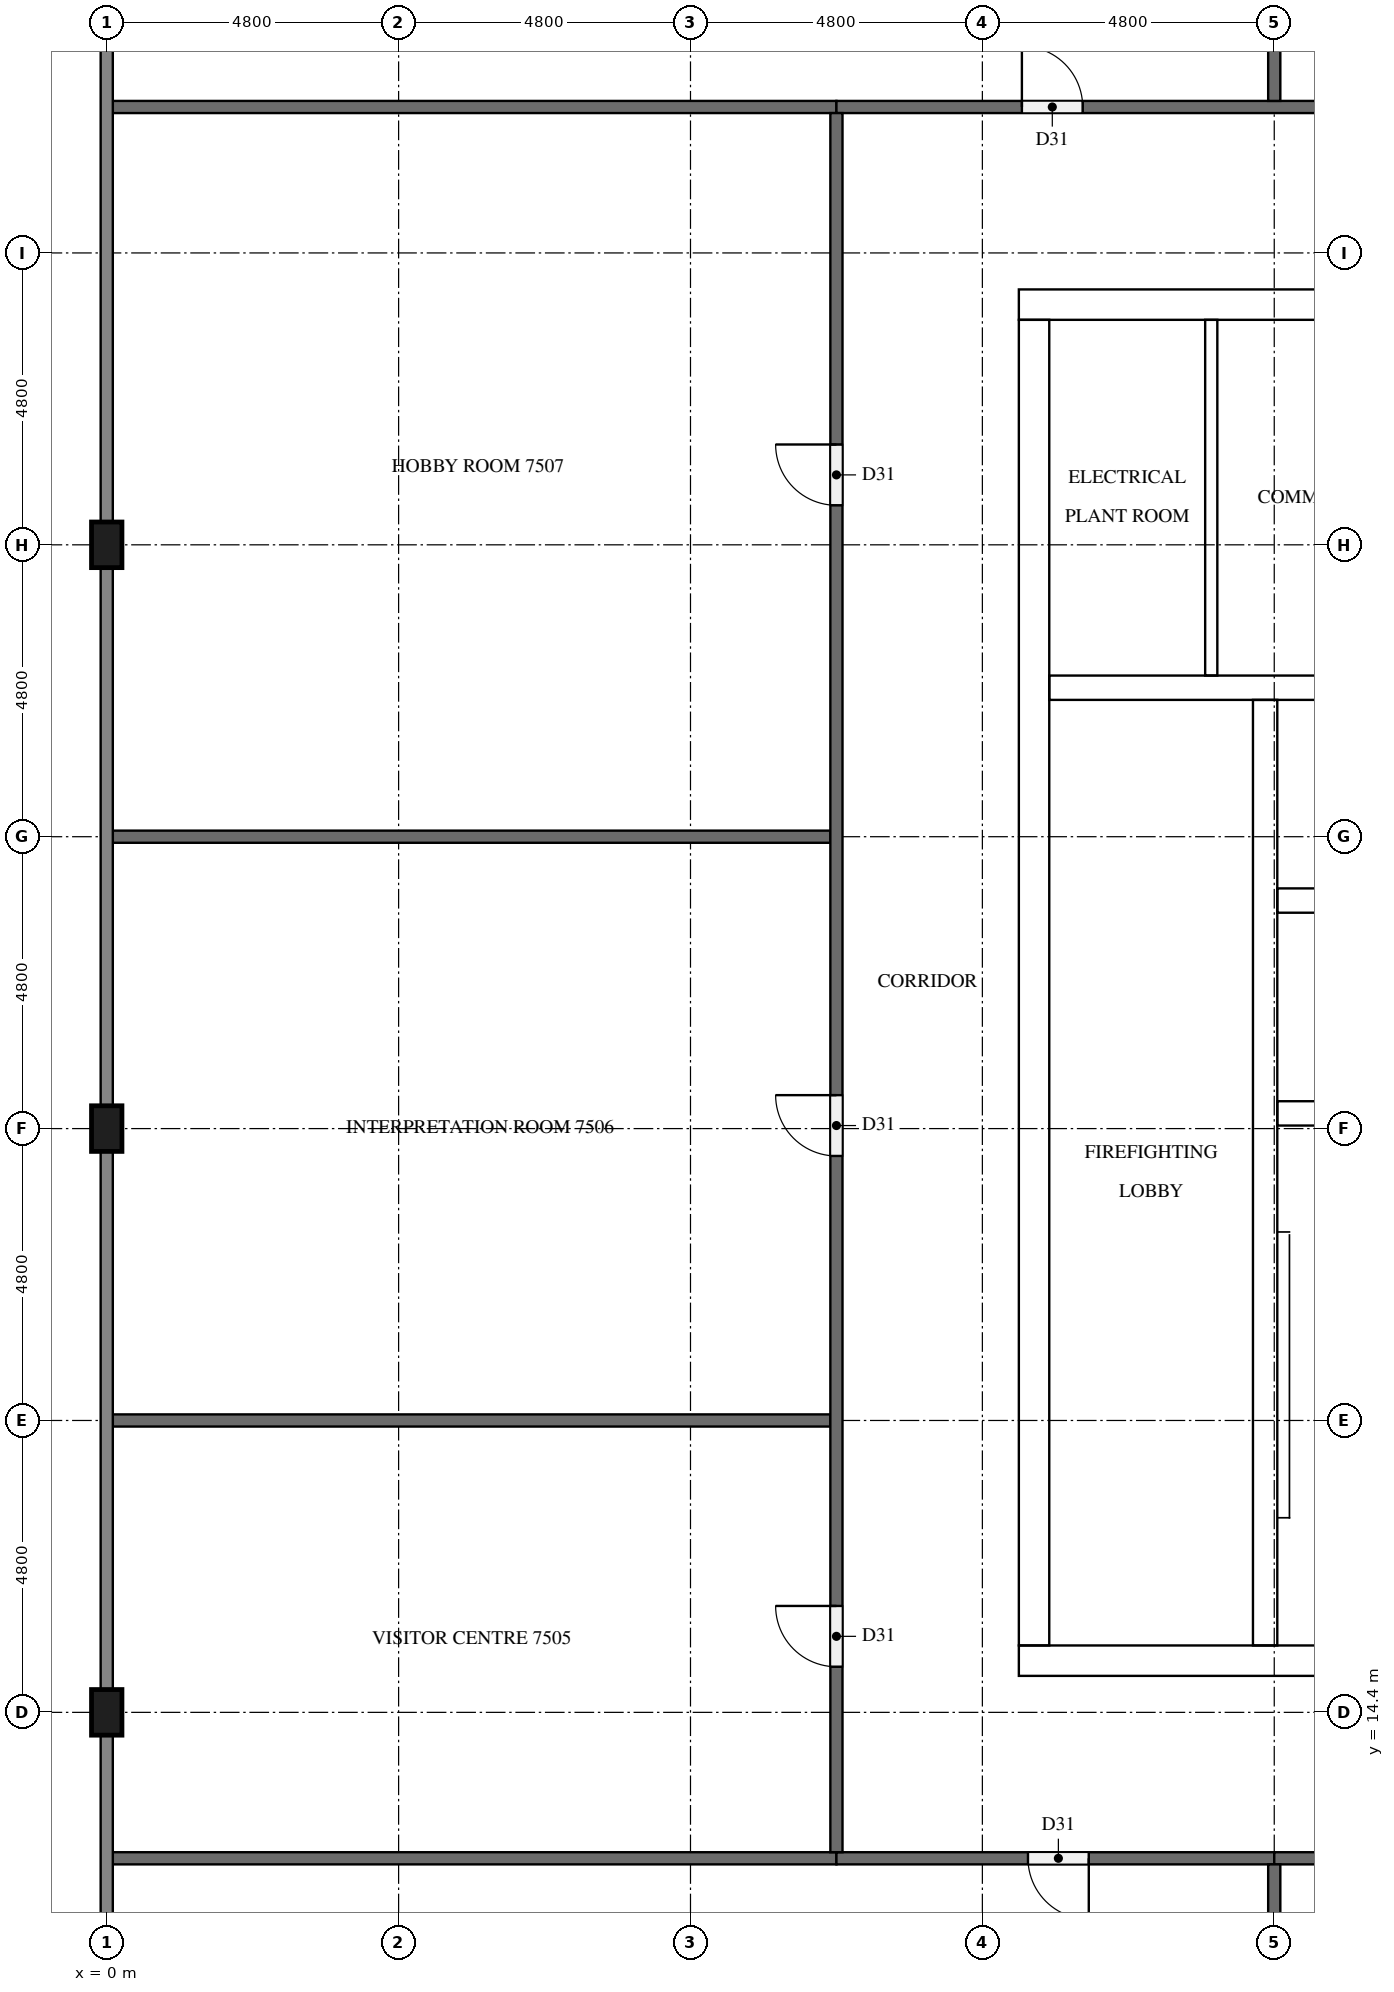
"""IFC4 building model, lengths in metres.
Left out: names, types, materials, properties, quantities, classifications, styles, units other than length and angle.
Written with IfcOpenShell. Run it as: python <this file> out.ifc"""

import sys

from ifc_helpers import new_model, si_unit, direction, frame, frame_2d, origin, origin_2d, place, context, subcontext, project, spatial, rectangle, extrude, element, fill, save


model = new_model("IFC4")
c1 = context("Model", 3, precision=1e-05, world=origin(), true_north=direction((0.0, 1.0)))
c2 = subcontext(c1, "Body", "Model", "MODEL_VIEW")
j1 = project(units=[si_unit("LENGTHUNIT", "METRE"), si_unit("PLANEANGLEUNIT", "RADIAN")], contexts=[c1])
p1 = place(None, origin())
s1 = spatial("IfcSite", under=j1, at=p1, CompositionType="ELEMENT")
p2 = place(p1, origin())
s2 = spatial("IfcBuilding", under=s1, at=p2, CompositionType="ELEMENT")
p3 = place(p2, frame((0.0, 0.0, 286.1)))
s3 = spatial("IfcBuildingStorey", under=s2, at=p3, CompositionType="ELEMENT", Elevation=286.1)
p4 = place(p3, frame((15.0, 15.25, 0.0), z_axis=(0.0, 0.0, 1.0), x_axis=(1.0, 0.0, 0.0)))
e1 = element("IfcWall", 1, at=p4, inside=s3, PredefinedType="SHEAR", context=c2, shape_type="SweptSolid", body=[
    extrude(rectangle(XDim=32.4, YDim=0.5, at=frame_2d((16.2, 0.0))), origin(), (0.0, 0.0, 1.0), 5.1),
])
p5 = place(p4, frame((15.3, 0.0, 0.0)))
e2 = element("IfcOpeningElement", 2, at=p5, cuts=e1, PredefinedType="OPENING", context=c2, shape_type="SweptSolid", body=[
    extrude(rectangle(XDim=1.8, YDim=2.1, at=frame_2d((0.9, 1.05))), frame((0.0, 0.26, 0.0), z_axis=(0.0, -1.0, 0.0), x_axis=(1.0, 0.0, 0.0)), (0.0, 0.0, 1.0), 0.52),
])
p6 = place(p3, frame((15.0, 37.55, 0.0), z_axis=(0.0, 0.0, 1.0), x_axis=(1.0, 0.0, 0.0)))
e3 = element("IfcWall", 3, at=p6, inside=s3, PredefinedType="SHEAR", context=c2, shape_type="SweptSolid", body=[
    extrude(rectangle(XDim=32.4, YDim=0.5, at=frame_2d((16.2, 0.0))), origin(), (0.0, 0.0, 1.0), 5.1),
])
p7 = place(p6, frame((15.3, 0.0, 0.0)))
e4 = element("IfcOpeningElement", 4, at=p7, cuts=e3, PredefinedType="OPENING", context=c2, shape_type="SweptSolid", body=[
    extrude(rectangle(XDim=1.8, YDim=2.1, at=frame_2d((0.9, 1.05))), frame((0.0, 0.26, 0.0), z_axis=(0.0, -1.0, 0.0), x_axis=(1.0, 0.0, 0.0)), (0.0, 0.0, 1.0), 0.52),
])
p8 = place(p6, frame((1.282, 0.0, 0.0)))
e5 = element("IfcOpeningElement", 5, at=p8, cuts=e3, PredefinedType="OPENING", context=c2, shape_type="SweptSolid", body=[
    extrude(rectangle(XDim=1.0, YDim=2.1, at=frame_2d((0.5, 1.05))), frame((0.0, 0.26, 0.0), z_axis=(0.0, -1.0, 0.0), x_axis=(1.0, 0.0, 0.0)), (0.0, 0.0, 1.0), 0.52),
])
p9 = place(p6, frame((5.082, 0.0, 0.0)))
e6 = element("IfcOpeningElement", 6, at=p9, cuts=e3, PredefinedType="OPENING", context=c2, shape_type="SweptSolid", body=[
    extrude(rectangle(XDim=1.0, YDim=2.1, at=frame_2d((0.5, 1.05))), frame((0.0, 0.26, 0.0), z_axis=(0.0, -1.0, 0.0), x_axis=(1.0, 0.0, 0.0)), (0.0, 0.0, 1.0), 0.52),
])
p10 = place(p3, frame((15.25, 15.5, 0.0), z_axis=(0.0, 0.0, 1.0), x_axis=(0.0, 1.0, 0.0)))
e7 = element("IfcWall", 7, at=p10, inside=s3, PredefinedType="SHEAR", context=c2, shape_type="SweptSolid", body=[
    extrude(rectangle(XDim=21.8, YDim=0.5, at=frame_2d((10.9, 0.0))), origin(), (0.0, 0.0, 1.0), 5.1),
])
p11 = place(p10, frame((5.26, 0.0, 0.0)))
e8 = element("IfcOpeningElement", 8, at=p11, cuts=e7, PredefinedType="OPENING", context=c2, shape_type="SweptSolid", body=[
    extrude(rectangle(XDim=1.2, YDim=2.1, at=frame_2d((0.6, 1.05))), frame((0.0, 0.26, 0.0), z_axis=(0.0, -1.0, 0.0), x_axis=(1.0, 0.0, 0.0)), (0.0, 0.0, 1.0), 0.52),
])
p12 = place(p3, frame((19.05, 15.5, 0.0), z_axis=(0.0, 0.0, 1.0), x_axis=(0.0, 1.0, 0.0)))
e9 = element("IfcWall", 9, at=p12, inside=s3, PredefinedType="SHEAR", context=c2, shape_type="SweptSolid", body=[
    extrude(rectangle(XDim=15.55, YDim=0.4, at=frame_2d((7.775, 0.0))), origin(), (0.0, 0.0, 1.0), 5.1),
])
p13 = place(p12, frame((9.95, 0.0, 0.0)))
e10 = element("IfcOpeningElement", 10, at=p13, cuts=e9, PredefinedType="OPENING", context=c2, shape_type="SweptSolid", body=[
    extrude(rectangle(XDim=1.1, YDim=2.1, at=frame_2d((0.55, 1.05))), frame((0.0, 0.21, 0.0), z_axis=(0.0, -1.0, 0.0), x_axis=(1.0, 0.0, 0.0)), (0.0, 0.0, 1.0), 0.42),
])
p14 = place(p12, frame((13.45, 0.0, 0.0)))
e11 = element("IfcOpeningElement", 11, at=p14, cuts=e9, PredefinedType="OPENING", context=c2, shape_type="SweptSolid", body=[
    extrude(rectangle(XDim=1.1, YDim=2.1, at=frame_2d((0.55, 1.05))), frame((0.0, 0.21, 0.0), z_axis=(0.0, -1.0, 0.0), x_axis=(1.0, 0.0, 0.0)), (0.0, 0.0, 1.0), 0.42),
])
p15 = place(p12, frame((0.7, 0.0, 0.0)))
e12 = element("IfcOpeningElement", 12, at=p15, cuts=e9, PredefinedType="OPENING", context=c2, shape_type="SweptSolid", body=[
    extrude(rectangle(XDim=1.2, YDim=2.1, at=frame_2d((0.6, 1.05))), frame((0.0, 0.21, 0.0), z_axis=(0.0, -1.0, 0.0), x_axis=(1.0, 0.0, 0.0)), (0.0, 0.0, 1.0), 0.42),
])
for number, where, z_axis, x_axis in (
    (13, (19.25, 24.25, 0.0), (0.0, 0.0, 1.0), (1.0, 0.0, 0.0)),
    (14, (19.25, 27.75, 0.0), (0.0, 0.0, 1.0), (1.0, 0.0, 0.0)),
):
    element("IfcWall", number, at=place(p3, frame(where, z_axis=z_axis, x_axis=x_axis)), inside=s3, PredefinedType="SHEAR", context=c2, shape_type="SweptSolid", body=[
        extrude(rectangle(XDim=3.65, YDim=0.4, at=frame_2d((1.825, 0.0))), origin(), (0.0, 0.0, 1.0), 5.1),
    ])
p16 = place(p3, frame((15.5, 31.25, 0.0), z_axis=(0.0, 0.0, 1.0), x_axis=(1.0, 0.0, 0.0)))
e15 = element("IfcWall", 15, at=p16, inside=s3, PredefinedType="SHEAR", context=c2, shape_type="SweptSolid", body=[
    extrude(rectangle(XDim=7.4, YDim=0.4, at=frame_2d((3.7, 0.0))), origin(), (0.0, 0.0, 1.0), 5.1),
])
for number, where, z_axis, x_axis in (
    (16, (0.0, 33.6, 0.0), (0.0, 0.0, 1.0), (0.0, 1.0, 0.0)),
    (17, (0.0, 24.0, 0.0), (0.0, 0.0, 1.0), (0.0, 1.0, 0.0)),
    (18, (0.0, 14.4, 0.0), (0.0, 0.0, 1.0), (0.0, 1.0, 0.0)),
):
    element("IfcColumn", number, at=place(p3, frame(where, z_axis=z_axis, x_axis=x_axis)), inside=s3, PredefinedType="COLUMN", context=c2, shape_type="SweptSolid", body=[
        extrude(rectangle(XDim=0.75, YDim=0.5, at=origin_2d()), origin(), (0.0, 0.0, 1.0), 5.1),
    ])
p17 = place(p3, frame((18.164, 31.45, 0.0), z_axis=(0.0, 0.0, 1.0), x_axis=(0.0, 1.0, 0.0)))
e19 = element("IfcWall", 19, at=p17, inside=s3, PredefinedType="PARTITIONING", context=c2, shape_type="SweptSolid", body=[
    extrude(rectangle(XDim=5.85, YDim=0.2, at=frame_2d((2.925, 0.0))), origin(), (0.0, 0.0, 1.0), 5.1),
])
p18 = place(p3, frame((0.1, 12.0, 0.0), z_axis=(0.0, 0.0, 1.0), x_axis=(1.0, 0.0, 0.0)))
e20 = element("IfcWall", 20, at=p18, inside=s3, PredefinedType="PARTITIONING", context=c2, shape_type="SweptSolid", body=[
    extrude(rectangle(XDim=11.9, YDim=0.2, at=frame_2d((5.95, 0.0))), origin(), (0.0, 0.0, 1.0), 5.1),
])
p19 = place(p3, frame((19.2, 12.0, 0.0), z_axis=(0.0, 0.0, 1.0), x_axis=(-1.0, 0.0, 0.0)))
e21 = element("IfcWall", 21, at=p19, inside=s3, PredefinedType="PARTITIONING", context=c2, shape_type="SweptSolid", body=[
    extrude(rectangle(XDim=7.2, YDim=0.2, at=frame_2d((3.6, 0.0))), origin(), (0.0, 0.0, 1.0), 5.1),
])
p20 = place(p19, frame((3.05, 0.0, 0.0)))
e22 = element("IfcOpeningElement", 22, at=p20, cuts=e21, PredefinedType="OPENING", context=c2, shape_type="SweptSolid", body=[
    extrude(rectangle(XDim=1.0, YDim=2.1, at=frame_2d((0.5, 1.05))), frame((0.0, 0.11, 0.0), z_axis=(0.0, -1.0, 0.0), x_axis=(1.0, 0.0, 0.0)), (0.0, 0.0, 1.0), 0.22),
])
p21 = place(p3, frame((19.2, 12.0, 0.0), z_axis=(0.0, 0.0, 1.0), x_axis=(1.0, 0.0, 0.0)))
e23 = element("IfcWall", 23, at=p21, inside=s3, PredefinedType="PARTITIONING", context=c2, shape_type="SweptSolid", body=[
    extrude(rectangle(XDim=9.6, YDim=0.2, at=frame_2d((4.8, 0.0))), origin(), (0.0, 0.0, 1.0), 5.1),
])
p22 = place(p21, frame((6.65, 0.0, 0.0)))
e24 = element("IfcOpeningElement", 24, at=p22, cuts=e23, PredefinedType="OPENING", context=c2, shape_type="SweptSolid", body=[
    extrude(rectangle(XDim=1.0, YDim=2.1, at=frame_2d((0.5, 1.05))), frame((0.0, 0.11, 0.0), z_axis=(0.0, -1.0, 0.0), x_axis=(1.0, 0.0, 0.0)), (0.0, 0.0, 1.0), 0.22),
])
p23 = place(p21, frame((1.85, 0.0, 0.0)))
e25 = element("IfcOpeningElement", 25, at=p23, cuts=e23, PredefinedType="OPENING", context=c2, shape_type="SweptSolid", body=[
    extrude(rectangle(XDim=1.0, YDim=2.1, at=frame_2d((0.5, 1.05))), frame((0.0, 0.11, 0.0), z_axis=(0.0, -1.0, 0.0), x_axis=(1.0, 0.0, 0.0)), (0.0, 0.0, 1.0), 0.22),
])
for number, where, z_axis, x_axis in (
    (26, (0.1, 19.2, 0.0), (0.0, 0.0, 1.0), (1.0, 0.0, 0.0)),
    (27, (0.1, 28.8, 0.0), (0.0, 0.0, 1.0), (1.0, 0.0, 0.0)),
):
    element("IfcWall", number, at=place(p3, frame(where, z_axis=z_axis, x_axis=x_axis)), inside=s3, PredefinedType="PARTITIONING", context=c2, shape_type="SweptSolid", body=[
        extrude(rectangle(XDim=11.8, YDim=0.2, at=frame_2d((5.9, 0.0))), origin(), (0.0, 0.0, 1.0), 5.1),
    ])
p24 = place(p3, frame((0.1, 40.8, 0.0), z_axis=(0.0, 0.0, 1.0), x_axis=(1.0, 0.0, 0.0)))
e28 = element("IfcWall", 28, at=p24, inside=s3, PredefinedType="PARTITIONING", context=c2, shape_type="SweptSolid", body=[
    extrude(rectangle(XDim=11.9, YDim=0.2, at=frame_2d((5.95, 0.0))), origin(), (0.0, 0.0, 1.0), 5.1),
])
p25 = place(p3, frame((12.0, 40.8, 0.0), z_axis=(0.0, 0.0, 1.0), x_axis=(1.0, 0.0, 0.0)))
e29 = element("IfcWall", 29, at=p25, inside=s3, PredefinedType="PARTITIONING", context=c2, shape_type="SweptSolid", body=[
    extrude(rectangle(XDim=29.4, YDim=0.2, at=frame_2d((14.7, 0.0))), origin(), (0.0, 0.0, 1.0), 5.1),
])
p26 = place(p25, frame((3.05, 0.0, 0.0)))
e30 = element("IfcOpeningElement", 30, at=p26, cuts=e29, PredefinedType="OPENING", context=c2, shape_type="SweptSolid", body=[
    extrude(rectangle(XDim=1.0, YDim=2.1, at=frame_2d((0.5, 1.05))), frame((0.0, 0.11, 0.0), z_axis=(0.0, -1.0, 0.0), x_axis=(1.0, 0.0, 0.0)), (0.0, 0.0, 1.0), 0.22),
])
p27 = place(p25, frame((11.55, 0.0, 0.0)))
e31 = element("IfcOpeningElement", 31, at=p27, cuts=e29, PredefinedType="OPENING", context=c2, shape_type="SweptSolid", body=[
    extrude(rectangle(XDim=1.0, YDim=2.1, at=frame_2d((0.5, 1.05))), frame((0.0, 0.11, 0.0), z_axis=(0.0, -1.0, 0.0), x_axis=(1.0, 0.0, 0.0)), (0.0, 0.0, 1.0), 0.22),
])
p28 = place(p25, frame((21.05, 0.0, 0.0)))
e32 = element("IfcOpeningElement", 32, at=p28, cuts=e29, PredefinedType="OPENING", context=c2, shape_type="SweptSolid", body=[
    extrude(rectangle(XDim=1.0, YDim=2.1, at=frame_2d((0.5, 1.05))), frame((0.0, 0.11, 0.0), z_axis=(0.0, -1.0, 0.0), x_axis=(1.0, 0.0, 0.0)), (0.0, 0.0, 1.0), 0.22),
])
p29 = place(p3, frame((12.0, 12.1, 0.0), z_axis=(0.0, 0.0, 1.0), x_axis=(0.0, 1.0, 0.0)))
e33 = element("IfcWall", 33, at=p29, inside=s3, PredefinedType="PARTITIONING", context=c2, shape_type="SweptSolid", body=[
    extrude(rectangle(XDim=28.6, YDim=0.2, at=frame_2d((14.3, 0.0))), origin(), (0.0, 0.0, 1.0), 5.1),
])
p30 = place(p29, frame((3.05, 0.0, 0.0)))
e34 = element("IfcOpeningElement", 34, at=p30, cuts=e33, PredefinedType="OPENING", context=c2, shape_type="SweptSolid", body=[
    extrude(rectangle(XDim=1.0, YDim=2.1, at=frame_2d((0.5, 1.05))), frame((0.0, 0.11, 0.0), z_axis=(0.0, -1.0, 0.0), x_axis=(1.0, 0.0, 0.0)), (0.0, 0.0, 1.0), 0.22),
])
p31 = place(p29, frame((11.45, 0.0, 0.0)))
e35 = element("IfcOpeningElement", 35, at=p31, cuts=e33, PredefinedType="OPENING", context=c2, shape_type="SweptSolid", body=[
    extrude(rectangle(XDim=1.0, YDim=2.1, at=frame_2d((0.5, 1.05))), frame((0.0, 0.11, 0.0), z_axis=(0.0, -1.0, 0.0), x_axis=(1.0, 0.0, 0.0)), (0.0, 0.0, 1.0), 0.22),
])
p32 = place(p29, frame((22.15, 0.0, 0.0)))
e36 = element("IfcOpeningElement", 36, at=p32, cuts=e33, PredefinedType="OPENING", context=c2, shape_type="SweptSolid", body=[
    extrude(rectangle(XDim=1.0, YDim=2.1, at=frame_2d((0.5, 1.05))), frame((0.0, 0.11, 0.0), z_axis=(0.0, -1.0, 0.0), x_axis=(1.0, 0.0, 0.0)), (0.0, 0.0, 1.0), 0.22),
])
p33 = place(p3, frame((19.2, 0.1, 0.0), z_axis=(0.0, 0.0, 1.0), x_axis=(0.0, 1.0, 0.0)))
e37 = element("IfcWall", 37, at=p33, inside=s3, PredefinedType="PARTITIONING", context=c2, shape_type="SweptSolid", body=[
    extrude(rectangle(XDim=11.8, YDim=0.2, at=frame_2d((5.9, 0.0))), origin(), (0.0, 0.0, 1.0), 5.1),
])
p34 = place(p3, frame((19.2, 40.9, 0.0), z_axis=(0.0, 0.0, 1.0), x_axis=(0.0, 1.0, 0.0)))
e38 = element("IfcWall", 38, at=p34, inside=s3, PredefinedType="PARTITIONING", context=c2, shape_type="SweptSolid", body=[
    extrude(rectangle(XDim=7.0, YDim=0.2, at=frame_2d((3.5, 0.0))), origin(), (0.0, 0.0, 1.0), 5.1),
])
p35 = place(p13, origin())
e39 = element("IfcDoor", 39, at=p35, inside=s3, OperationType="DOUBLE_DOOR_SLIDING", PredefinedType="DOOR", context=c2, shape_type="SweptSolid", body=[
    extrude(rectangle(XDim=1.1, YDim=2.1, at=frame_2d((0.55, 1.05))), frame((0.0, 0.025, 0.0), z_axis=(0.0, -1.0, 0.0), x_axis=(1.0, 0.0, 0.0)), (0.0, 0.0, 1.0), 0.05),
])
fill(e10, e39)
p36 = place(p14, origin())
e40 = element("IfcDoor", 40, at=p36, inside=s3, OperationType="DOUBLE_DOOR_SLIDING", PredefinedType="DOOR", context=c2, shape_type="SweptSolid", body=[
    extrude(rectangle(XDim=1.1, YDim=2.1, at=frame_2d((0.55, 1.05))), frame((0.0, 0.025, 0.0), z_axis=(0.0, -1.0, 0.0), x_axis=(1.0, 0.0, 0.0)), (0.0, 0.0, 1.0), 0.05),
])
fill(e11, e40)
p37 = place(p15, frame((1.2, 0.0, 0.0), z_axis=(0.0, 0.0, 1.0), x_axis=(-1.0, 0.0, 0.0)))
e41 = element("IfcDoor", 41, at=p37, inside=s3, OperationType="SINGLE_SWING_LEFT", PredefinedType="DOOR", context=c2, shape_type="SweptSolid", body=[
    extrude(rectangle(XDim=1.2, YDim=2.1, at=frame_2d((0.6, 1.05))), frame((0.0, 0.025, 0.0), z_axis=(0.0, -1.0, 0.0), x_axis=(1.0, 0.0, 0.0)), (0.0, 0.0, 1.0), 0.05),
])
fill(e12, e41)
p38 = place(p11, frame((1.2, 0.0, 0.0), z_axis=(0.0, 0.0, 1.0), x_axis=(-1.0, 0.0, 0.0)))
e42 = element("IfcDoor", 42, at=p38, inside=s3, OperationType="SINGLE_SWING_RIGHT", PredefinedType="DOOR", context=c2, shape_type="SweptSolid", body=[
    extrude(rectangle(XDim=1.2, YDim=2.1, at=frame_2d((0.6, 1.05))), frame((0.0, 0.025, 0.0), z_axis=(0.0, -1.0, 0.0), x_axis=(1.0, 0.0, 0.0)), (0.0, 0.0, 1.0), 0.05),
])
fill(e8, e42)
p39 = place(p8, origin())
e43 = element("IfcDoor", 43, at=p39, inside=s3, OperationType="SINGLE_SWING_RIGHT", PredefinedType="DOOR", context=c2, shape_type="SweptSolid", body=[
    extrude(rectangle(XDim=1.0, YDim=2.1, at=frame_2d((0.5, 1.05))), frame((0.0, 0.025, 0.0), z_axis=(0.0, -1.0, 0.0), x_axis=(1.0, 0.0, 0.0)), (0.0, 0.0, 1.0), 0.05),
])
fill(e5, e43)
p40 = place(p20, origin())
e44 = element("IfcDoor", 44, at=p40, inside=s3, OperationType="SINGLE_SWING_LEFT", PredefinedType="DOOR", context=c2, shape_type="SweptSolid", body=[
    extrude(rectangle(XDim=1.0, YDim=2.1, at=frame_2d((0.5, 1.05))), frame((0.0, 0.025, 0.0), z_axis=(0.0, -1.0, 0.0), x_axis=(1.0, 0.0, 0.0)), (0.0, 0.0, 1.0), 0.05),
])
fill(e22, e44)
p41 = place(p30, origin())
e45 = element("IfcDoor", 45, at=p41, inside=s3, OperationType="SINGLE_SWING_RIGHT", PredefinedType="DOOR", context=c2, shape_type="SweptSolid", body=[
    extrude(rectangle(XDim=1.0, YDim=2.1, at=frame_2d((0.5, 1.05))), frame((0.0, 0.025, 0.0), z_axis=(0.0, -1.0, 0.0), x_axis=(1.0, 0.0, 0.0)), (0.0, 0.0, 1.0), 0.05),
])
fill(e34, e45)
p42 = place(p31, origin())
e46 = element("IfcDoor", 46, at=p42, inside=s3, OperationType="SINGLE_SWING_RIGHT", PredefinedType="DOOR", context=c2, shape_type="SweptSolid", body=[
    extrude(rectangle(XDim=1.0, YDim=2.1, at=frame_2d((0.5, 1.05))), frame((0.0, 0.025, 0.0), z_axis=(0.0, -1.0, 0.0), x_axis=(1.0, 0.0, 0.0)), (0.0, 0.0, 1.0), 0.05),
])
fill(e35, e46)
p43 = place(p32, origin())
e47 = element("IfcDoor", 47, at=p43, inside=s3, OperationType="SINGLE_SWING_RIGHT", PredefinedType="DOOR", context=c2, shape_type="SweptSolid", body=[
    extrude(rectangle(XDim=1.0, YDim=2.1, at=frame_2d((0.5, 1.05))), frame((0.0, 0.025, 0.0), z_axis=(0.0, -1.0, 0.0), x_axis=(1.0, 0.0, 0.0)), (0.0, 0.0, 1.0), 0.05),
])
fill(e36, e47)
p44 = place(p26, origin())
e48 = element("IfcDoor", 48, at=p44, inside=s3, OperationType="SINGLE_SWING_LEFT", PredefinedType="DOOR", context=c2, shape_type="SweptSolid", body=[
    extrude(rectangle(XDim=1.0, YDim=2.1, at=frame_2d((0.5, 1.05))), frame((0.0, 0.025, 0.0), z_axis=(0.0, -1.0, 0.0), x_axis=(1.0, 0.0, 0.0)), (0.0, 0.0, 1.0), 0.05),
])
fill(e30, e48)
save(model, sys.argv[1])
